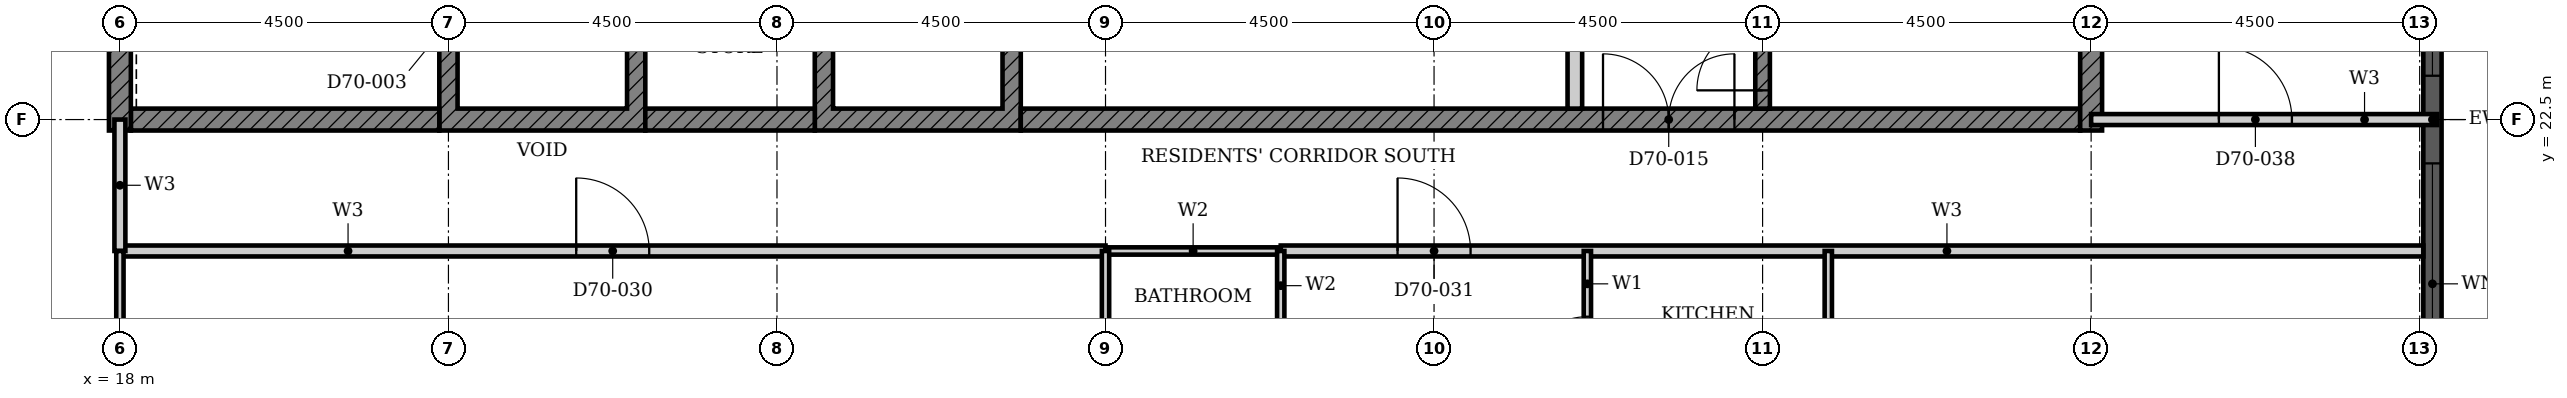
"""IFC4 building model, lengths in metres.
Left out: names, types, materials, properties, quantities, classifications, styles, units other than length and angle.
Written with IfcOpenShell. Run it as: python <this file> out.ifc"""

import sys

from ifc_helpers import new_model, si_unit, direction, frame, frame_2d, origin, place, context, subcontext, project, spatial, polyline, rectangle, outline, extrude, element, fill, save


model = new_model("IFC4")
c1 = context("Model", 3, precision=1e-05, world=origin(), true_north=direction((0.0, 1.0)))
c2 = subcontext(c1, "Body", "Model", "MODEL_VIEW")
j1 = project(units=[si_unit("LENGTHUNIT", "METRE"), si_unit("PLANEANGLEUNIT", "RADIAN")], contexts=[c1])
p1 = place(None, origin())
s1 = spatial("IfcSite", under=j1, at=p1, CompositionType="ELEMENT")
p2 = place(p1, origin())
s2 = spatial("IfcBuilding", under=s1, at=p2, CompositionType="ELEMENT")
p3 = place(p2, frame((0.0, 0.0, 274.9)))
s3 = spatial("IfcBuildingStorey", under=s2, at=p3, CompositionType="ELEMENT", Elevation=274.9)
p4 = place(p3, frame((49.675, 18.3, 0.0), z_axis=(0.0, 0.0, 1.0), x_axis=(0.0, 1.0, 0.0)))
e1 = element("IfcWall", 1, at=p4, inside=s3, PredefinedType="SOLIDWALL", context=c2, shape_type="SweptSolid", body=[
    extrude(rectangle(XDim=8.4, YDim=0.25, at=frame_2d((4.2, 0.0))), origin(), (0.0, 0.0, 1.0), 3.7),
])
p5 = place(p4, frame((0.3, 0.0, 0.45)))
e2 = element("IfcOpeningElement", 2, at=p5, cuts=e1, PredefinedType="OPENING", context=c2, shape_type="SweptSolid", body=[
    extrude(rectangle(XDim=3.3, YDim=2.3, at=frame_2d((1.65, 1.15))), frame((0.0, 0.135, 0.0), z_axis=(0.0, -1.0, 0.0), x_axis=(1.0, 0.0, 0.0)), (0.0, 0.0, 1.0), 0.27),
])
p6 = place(p4, frame((4.8, 0.0, 0.45)))
e3 = element("IfcOpeningElement", 3, at=p6, cuts=e1, PredefinedType="OPENING", context=c2, shape_type="SweptSolid", body=[
    extrude(rectangle(XDim=3.3, YDim=2.3, at=frame_2d((1.65, 1.15))), frame((0.0, 0.135, 0.0), z_axis=(0.0, -1.0, 0.0), x_axis=(1.0, 0.0, 0.0)), (0.0, 0.0, 1.0), 0.27),
])
p7 = place(p3, origin())
e4 = element("IfcWall", 4, at=p7, inside=s3, PredefinedType="SHEAR", context=c2, shape_type="SweptSolid", body=[
    extrude(outline(polyline([(22.375, 22.35), (25.197, 22.35), (25.197, 25.275), (24.947, 25.275), (24.947, 22.65), (22.625, 22.65), (22.625, 25.275), (22.375, 25.275), (22.375, 22.35)])), origin(), (0.0, 0.0, 1.0), 3.3),
])
p8 = place(p3, origin())
e5 = element("IfcWall", 5, at=p8, inside=s3, PredefinedType="SHEAR", context=c2, shape_type="SweptSolid", body=[
    extrude(outline(polyline([(27.518, 22.35), (30.339, 22.35), (30.339, 25.275), (30.089, 25.275), (30.089, 22.65), (27.768, 22.65), (27.768, 25.275), (27.518, 25.275), (27.518, 22.35)])), origin(), (0.0, 0.0, 1.0), 3.3),
])
p9 = place(p3, frame((18.15, 22.5, 0.0), z_axis=(0.0, 0.0, 1.0), x_axis=(1.0, 0.0, 0.0)))
e6 = element("IfcWall", 6, at=p9, inside=s3, PredefinedType="SHEAR", context=c2, shape_type="SweptSolid", body=[
    extrude(rectangle(XDim=4.225, YDim=0.3, at=frame_2d((2.113, 0.0))), origin(), (0.0, 0.0, 1.0), 3.3),
])
p10 = place(p3, frame((25.197, 22.5, 0.0), z_axis=(0.0, 0.0, 1.0), x_axis=(1.0, 0.0, 0.0)))
e7 = element("IfcWall", 7, at=p10, inside=s3, PredefinedType="SHEAR", context=c2, shape_type="SweptSolid", body=[
    extrude(rectangle(XDim=2.321, YDim=0.3, at=frame_2d((1.161, 0.0))), origin(), (0.0, 0.0, 1.0), 3.3),
])
p11 = place(p3, frame((30.339, 22.5, 0.0), z_axis=(0.0, 0.0, 1.0), x_axis=(1.0, 0.0, 0.0)))
e8 = element("IfcWall", 8, at=p11, inside=s3, PredefinedType="SHEAR", context=c2, shape_type="SweptSolid", body=[
    extrude(rectangle(XDim=14.511, YDim=0.3, at=frame_2d((7.255, 0.0))), origin(), (0.0, 0.0, 1.0), 3.3),
])
p12 = place(p11, frame((7.975, 0.0, 0.0)))
e9 = element("IfcOpeningElement", 9, at=p12, cuts=e8, PredefinedType="OPENING", context=c2, shape_type="SweptSolid", body=[
    extrude(rectangle(XDim=1.8, YDim=2.1, at=frame_2d((0.9, 1.05))), frame((0.0, 0.16, 0.0), z_axis=(0.0, -1.0, 0.0), x_axis=(1.0, 0.0, 0.0)), (0.0, 0.0, 1.0), 0.32),
])
for number, where, z_axis, x_axis in (
    (10, (18.0, 22.35, 0.0), (0.0, 0.0, 1.0), (0.0, 1.0, 0.0)),
    (11, (45.0, 22.35, 0.0), (0.0, 0.0, 1.0), (0.0, 1.0, 0.0)),
):
    element("IfcWall", number, at=place(p3, frame(where, z_axis=z_axis, x_axis=x_axis)), inside=s3, PredefinedType="SHEAR", context=c2, shape_type="SweptSolid", body=[
        extrude(rectangle(XDim=9.3, YDim=0.3, at=frame_2d((4.65, 0.0))), origin(), (0.0, 0.0, 1.0), 3.3),
    ])
p13 = place(p3, frame((37.928, 22.65, 0.0), z_axis=(0.0, 0.0, 1.0), x_axis=(0.0, 1.0, 0.0)))
e12 = element("IfcWall", 12, at=p13, inside=s3, PredefinedType="PARTITIONING", context=c2, shape_type="SweptSolid", body=[
    extrude(rectangle(XDim=2.625, YDim=0.2, at=frame_2d((1.312, 0.0))), origin(), (0.0, 0.0, 1.0), 3.3),
])
p14 = place(p3, frame((40.5, 22.65, 0.0), z_axis=(0.0, 0.0, 1.0), x_axis=(0.0, 1.0, 0.0)))
e13 = element("IfcWall", 13, at=p14, inside=s3, PredefinedType="SHEAR", context=c2, shape_type="SweptSolid", body=[
    extrude(rectangle(XDim=5.825, YDim=0.2, at=frame_2d((2.913, 0.0))), origin(), (0.0, 0.0, 1.0), 3.3),
])
p15 = place(p14, frame((0.25, 0.0, 0.0)))
e14 = element("IfcOpeningElement", 14, at=p15, cuts=e13, PredefinedType="OPENING", context=c2, shape_type="SweptSolid", body=[
    extrude(rectangle(XDim=1.8, YDim=2.1, at=frame_2d((0.9, 1.05))), frame((0.0, 0.11, 0.0), z_axis=(0.0, -1.0, 0.0), x_axis=(1.0, 0.0, 0.0)), (0.0, 0.0, 1.0), 0.22),
])
p16 = place(p3, frame((18.0, 20.7, 0.0), z_axis=(0.0, 0.0, 1.0), x_axis=(1.0, 0.0, 0.0)))
e15 = element("IfcWall", 15, at=p16, inside=s3, PredefinedType="PARTITIONING", context=c2, shape_type="SweptSolid", body=[
    extrude(rectangle(XDim=13.5, YDim=0.15, at=frame_2d((6.75, 0.0))), origin(), (0.0, 0.0, 1.0), 3.3),
])
p17 = place(p16, frame((6.25, 0.0, 0.0)))
e16 = element("IfcOpeningElement", 16, at=p17, cuts=e15, PredefinedType="OPENING", context=c2, shape_type="SweptSolid", body=[
    extrude(rectangle(XDim=1.0, YDim=2.1, at=frame_2d((0.5, 1.05))), frame((0.0, 0.085, 0.0), z_axis=(0.0, -1.0, 0.0), x_axis=(1.0, 0.0, 0.0)), (0.0, 0.0, 1.0), 0.17),
])
p18 = place(p3, frame((33.9, 20.7, 0.0), z_axis=(0.0, 0.0, 1.0), x_axis=(1.0, 0.0, 0.0)))
e17 = element("IfcWall", 17, at=p18, inside=s3, PredefinedType="PARTITIONING", context=c2, shape_type="SweptSolid", body=[
    extrude(rectangle(XDim=15.65, YDim=0.15, at=frame_2d((7.825, 0.0))), origin(), (0.0, 0.0, 1.0), 3.3),
])
p19 = place(p18, frame((1.6, 0.0, 0.0)))
e18 = element("IfcOpeningElement", 18, at=p19, cuts=e17, PredefinedType="OPENING", context=c2, shape_type="SweptSolid", body=[
    extrude(rectangle(XDim=1.0, YDim=2.2, at=frame_2d((0.5, 1.1))), frame((0.0, 0.085, 0.0), z_axis=(0.0, -1.0, 0.0), x_axis=(1.0, 0.0, 0.0)), (0.0, 0.0, 1.0), 0.17),
])
p20 = place(p3, frame((45.0, 22.5, 0.0), z_axis=(0.0, 0.0, 1.0), x_axis=(1.0, 0.0, 0.0)))
e19 = element("IfcWall", 19, at=p20, inside=s3, PredefinedType="PARTITIONING", context=c2, shape_type="SweptSolid", body=[
    extrude(rectangle(XDim=4.74, YDim=0.15, at=frame_2d((2.37, 0.0))), origin(), (0.0, 0.0, 1.0), 3.3),
])
p21 = place(p20, frame((1.75, 0.0, 0.0)))
e20 = element("IfcOpeningElement", 20, at=p21, cuts=e19, PredefinedType="OPENING", context=c2, shape_type="SweptSolid", body=[
    extrude(rectangle(XDim=1.0, YDim=2.1, at=frame_2d((0.5, 1.05))), frame((0.0, 0.085, 0.0), z_axis=(0.0, -1.0, 0.0), x_axis=(1.0, 0.0, 0.0)), (0.0, 0.0, 1.0), 0.17),
])
p22 = place(p3, frame((18.0, 20.7, 0.0), z_axis=(0.0, 0.0, 1.0), x_axis=(0.0, 1.0, 0.0)))
e21 = element("IfcWall", 21, at=p22, inside=s3, PredefinedType="PARTITIONING", context=c2, shape_type="SweptSolid", body=[
    extrude(rectangle(XDim=1.8, YDim=0.15, at=frame_2d((0.9, 0.0))), origin(), (0.0, 0.0, 1.0), 3.3),
])
p23 = place(p3, frame((18.0, 18.0, 0.0), z_axis=(0.0, 0.0, 1.0), x_axis=(0.0, 1.0, 0.0)))
e22 = element("IfcWall", 22, at=p23, inside=s3, PredefinedType="PARTITIONING", context=c2, shape_type="SweptSolid", body=[
    extrude(rectangle(XDim=2.7, YDim=0.1, at=frame_2d((1.35, 0.0))), origin(), (0.0, 0.0, 1.0), 3.3),
])
p24 = place(p3, frame((38.1, 18.0, 0.0), z_axis=(0.0, 0.0, 1.0), x_axis=(0.0, 1.0, 0.0)))
e23 = element("IfcWall", 23, at=p24, inside=s3, PredefinedType="PARTITIONING", context=c2, shape_type="SweptSolid", body=[
    extrude(rectangle(XDim=2.7, YDim=0.1, at=frame_2d((1.35, 0.0))), origin(), (0.0, 0.0, 1.0), 3.3),
])
p25 = place(p24, frame((0.9, 0.0, 0.0)))
e24 = element("IfcOpeningElement", 24, at=p25, cuts=e23, PredefinedType="OPENING", context=c2, shape_type="SweptSolid", body=[
    extrude(rectangle(XDim=0.9, YDim=2.1, at=frame_2d((0.45, 1.05))), frame((0.0, 0.06, 0.0), z_axis=(0.0, -1.0, 0.0), x_axis=(1.0, 0.0, 0.0)), (0.0, 0.0, 1.0), 0.12),
])
p26 = place(p3, frame((41.4, 18.0, 0.0), z_axis=(0.0, 0.0, 1.0), x_axis=(0.0, 1.0, 0.0)))
e25 = element("IfcWall", 25, at=p26, inside=s3, PredefinedType="PARTITIONING", context=c2, shape_type="SweptSolid", body=[
    extrude(rectangle(XDim=2.7, YDim=0.1, at=frame_2d((1.35, 0.0))), origin(), (0.0, 0.0, 1.0), 3.3),
])
p27 = place(p3, frame((31.5, 20.7, 0.0), z_axis=(0.0, 0.0, 1.0), x_axis=(1.0, 0.0, 0.0)))
e26 = element("IfcWall", 26, at=p27, inside=s3, PredefinedType="PARTITIONING", context=c2, shape_type="SweptSolid", body=[
    extrude(rectangle(XDim=2.4, YDim=0.1, at=frame_2d((1.2, 0.0))), origin(), (0.0, 0.0, 1.0), 3.3),
])
p28 = place(p3, frame((31.5, 18.0, 0.0), z_axis=(0.0, 0.0, 1.0), x_axis=(0.0, 1.0, 0.0)))
e27 = element("IfcWall", 27, at=p28, inside=s3, PredefinedType="PARTITIONING", context=c2, shape_type="SweptSolid", body=[
    extrude(rectangle(XDim=2.7, YDim=0.1, at=frame_2d((1.35, 0.0))), origin(), (0.0, 0.0, 1.0), 3.3),
])
p29 = place(p3, frame((33.9, 18.0, 0.0), z_axis=(0.0, 0.0, 1.0), x_axis=(0.0, 1.0, 0.0)))
e28 = element("IfcWall", 28, at=p29, inside=s3, PredefinedType="PARTITIONING", context=c2, shape_type="SweptSolid", body=[
    extrude(rectangle(XDim=2.7, YDim=0.1, at=frame_2d((1.35, 0.0))), origin(), (0.0, 0.0, 1.0), 3.3),
])
p30 = place(p29, frame((0.95, 0.0, 0.0)))
e29 = element("IfcOpeningElement", 29, at=p30, cuts=e28, PredefinedType="OPENING", context=c2, shape_type="SweptSolid", body=[
    extrude(rectangle(XDim=0.8, YDim=2.1, at=frame_2d((0.4, 1.05))), frame((0.0, 0.06, 0.0), z_axis=(0.0, -1.0, 0.0), x_axis=(1.0, 0.0, 0.0)), (0.0, 0.0, 1.0), 0.12),
])
p31 = place(p5, origin())
e30 = element("IfcWindow", 30, at=p31, inside=s3, PartitioningType="SINGLE_PANEL", PredefinedType="WINDOW", context=c2, shape_type="SweptSolid", body=[
    extrude(rectangle(XDim=3.3, YDim=2.3, at=frame_2d((1.65, 1.15))), frame((0.0, 0.03, 0.0), z_axis=(0.0, -1.0, 0.0), x_axis=(1.0, 0.0, 0.0)), (0.0, 0.0, 1.0), 0.06),
])
fill(e2, e30)
p32 = place(p6, origin())
e31 = element("IfcWindow", 31, at=p32, inside=s3, PartitioningType="SINGLE_PANEL", PredefinedType="WINDOW", context=c2, shape_type="SweptSolid", body=[
    extrude(rectangle(XDim=3.3, YDim=2.3, at=frame_2d((1.65, 1.15))), frame((0.0, 0.03, 0.0), z_axis=(0.0, -1.0, 0.0), x_axis=(1.0, 0.0, 0.0)), (0.0, 0.0, 1.0), 0.06),
])
fill(e3, e31)
p33 = place(p15, origin())
e32 = element("IfcDoor", 32, at=p33, inside=s3, OperationType="DOUBLE_DOOR_SINGLE_SWING", PredefinedType="DOOR", context=c2, shape_type="SweptSolid", body=[
    extrude(rectangle(XDim=1.8, YDim=2.1, at=frame_2d((0.9, 1.05))), frame((0.0, 0.025, 0.0), z_axis=(0.0, -1.0, 0.0), x_axis=(1.0, 0.0, 0.0)), (0.0, 0.0, 1.0), 0.05),
])
fill(e14, e32)
p34 = place(p12, origin())
e33 = element("IfcDoor", 33, at=p34, inside=s3, OperationType="DOUBLE_DOOR_SINGLE_SWING", PredefinedType="DOOR", context=c2, shape_type="SweptSolid", body=[
    extrude(rectangle(XDim=1.8, YDim=2.1, at=frame_2d((0.9, 1.05))), frame((0.0, 0.025, 0.0), z_axis=(0.0, -1.0, 0.0), x_axis=(1.0, 0.0, 0.0)), (0.0, 0.0, 1.0), 0.05),
])
fill(e9, e33)
p35 = place(p17, origin())
e34 = element("IfcDoor", 34, at=p35, inside=s3, OperationType="SINGLE_SWING_LEFT", PredefinedType="DOOR", context=c2, shape_type="SweptSolid", body=[
    extrude(rectangle(XDim=1.0, YDim=2.1, at=frame_2d((0.5, 1.05))), frame((0.0, 0.025, 0.0), z_axis=(0.0, -1.0, 0.0), x_axis=(1.0, 0.0, 0.0)), (0.0, 0.0, 1.0), 0.05),
])
fill(e16, e34)
p36 = place(p19, origin())
e35 = element("IfcDoor", 35, at=p36, inside=s3, OperationType="SINGLE_SWING_RIGHT", PredefinedType="DOOR", context=c2, shape_type="SweptSolid", body=[
    extrude(rectangle(XDim=1.0, YDim=2.2, at=frame_2d((0.5, 1.1))), frame((0.0, 0.025, 0.0), z_axis=(0.0, -1.0, 0.0), x_axis=(1.0, 0.0, 0.0)), (0.0, 0.0, 1.0), 0.05),
])
fill(e18, e35)
p37 = place(p25, origin())
e36 = element("IfcDoor", 36, at=p37, inside=s3, OperationType="SINGLE_SWING_LEFT", PredefinedType="DOOR", context=c2, shape_type="SweptSolid", body=[
    extrude(rectangle(XDim=0.9, YDim=2.1, at=frame_2d((0.45, 1.05))), frame((0.0, 0.025, 0.0), z_axis=(0.0, -1.0, 0.0), x_axis=(1.0, 0.0, 0.0)), (0.0, 0.0, 1.0), 0.05),
])
fill(e24, e36)
p38 = place(p21, origin())
e37 = element("IfcDoor", 37, at=p38, inside=s3, OperationType="SINGLE_SWING_RIGHT", PredefinedType="DOOR", context=c2, shape_type="SweptSolid", body=[
    extrude(rectangle(XDim=1.0, YDim=2.1, at=frame_2d((0.5, 1.05))), frame((0.0, 0.025, 0.0), z_axis=(0.0, -1.0, 0.0), x_axis=(1.0, 0.0, 0.0)), (0.0, 0.0, 1.0), 0.05),
])
fill(e20, e37)
save(model, sys.argv[1])
